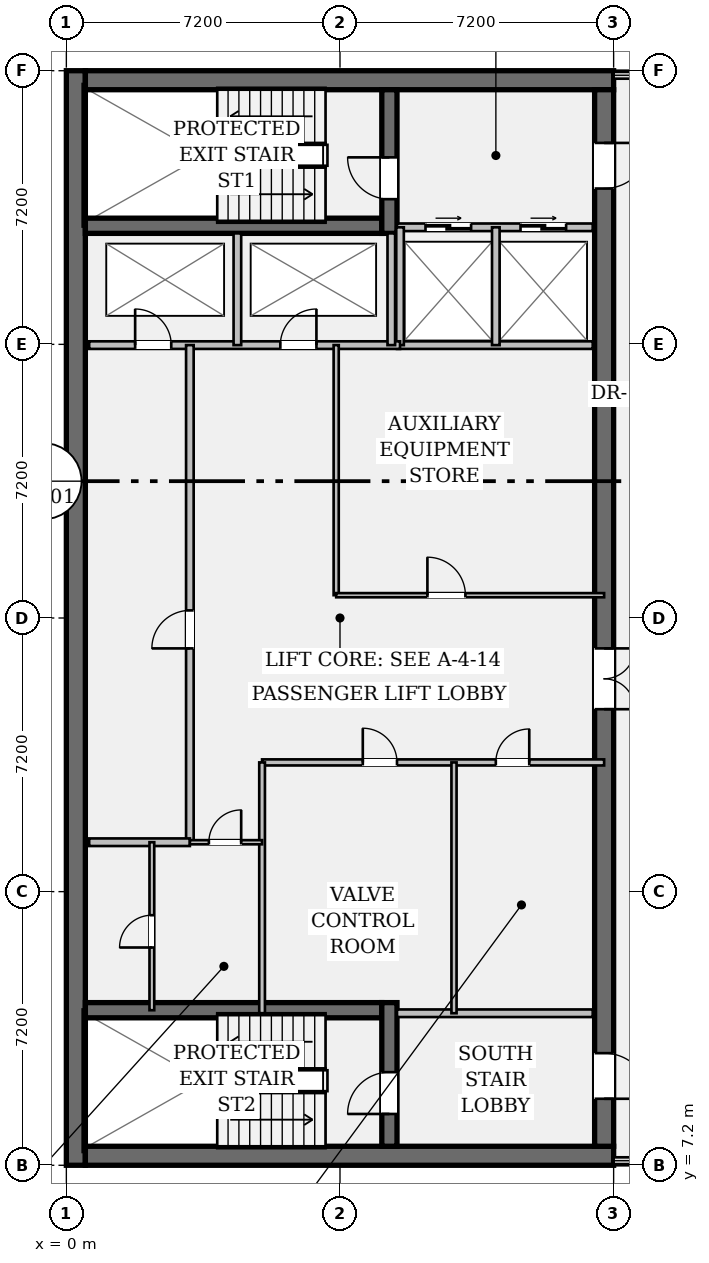
"""IFC4 building model, lengths in metres.
Left out: names, types, materials, properties, quantities, classifications, styles, units other than length and angle.
Written with IfcOpenShell. Run it as: python <this file> out.ifc"""

import sys

from ifc_helpers import new_model, si_unit, direction, frame, frame_2d, origin, place, context, subcontext, project, spatial, rectangle, extrude, element, fill, save


model = new_model("IFC4")
c1 = context("Model", 3, precision=1e-05, world=origin(), true_north=direction((0.0, 1.0)))
c2 = subcontext(c1, "Body", "Model", "MODEL_VIEW")
j1 = project(units=[si_unit("LENGTHUNIT", "METRE"), si_unit("PLANEANGLEUNIT", "RADIAN")], contexts=[c1])
p1 = place(None, origin())
s1 = spatial("IfcSite", under=j1, at=p1, CompositionType="ELEMENT")
p2 = place(p1, origin())
s2 = spatial("IfcBuilding", under=s1, at=p2, CompositionType="ELEMENT")
p3 = place(p2, frame((0.0, 0.0, 297.5)))
s3 = spatial("IfcBuildingStorey", under=s2, at=p3, CompositionType="ELEMENT", Elevation=297.5)
p4 = place(p3, frame((0.25, 7.2, 0.0), z_axis=(0.0, 0.0, 1.0), x_axis=(0.0, 1.0, 0.0)))
e1 = element("IfcWall", 1, at=p4, inside=s3, PredefinedType="SHEAR", context=c2, shape_type="SweptSolid", body=[
    extrude(rectangle(XDim=28.8, YDim=0.5, at=frame_2d((14.4, 0.0))), origin(), (0.0, 0.0, 1.0), 3.59),
])
for number, where, z_axis, x_axis in (
    (2, (0.5, 7.45, 0.0), (0.0, 0.0, 1.0), (1.0, 0.0, 0.0)),
    (3, (0.5, 35.75, 0.0), (0.0, 0.0, 1.0), (1.0, 0.0, 0.0)),
):
    element("IfcWall", number, at=place(p3, frame(where, z_axis=z_axis, x_axis=x_axis)), inside=s3, PredefinedType="SHEAR", context=c2, shape_type="SweptSolid", body=[
        extrude(rectangle(XDim=13.9, YDim=0.5, at=frame_2d((6.95, 0.0))), origin(), (0.0, 0.0, 1.0), 3.59),
    ])
p5 = place(p3, frame((14.15, 35.5, 0.0), z_axis=(0.0, 0.0, 1.0), x_axis=(0.0, -1.0, 0.0)))
e4 = element("IfcWall", 4, at=p5, inside=s3, PredefinedType="SHEAR", context=c2, shape_type="SweptSolid", body=[
    extrude(rectangle(XDim=27.8, YDim=0.5, at=frame_2d((13.9, 0.0))), origin(), (0.0, 0.0, 1.0), 3.59),
])
p6 = place(p5, frame((1.4, 0.0, 0.0)))
e5 = element("IfcOpeningElement", 5, at=p6, cuts=e4, PredefinedType="OPENING", context=c2, shape_type="SweptSolid", body=[
    extrude(rectangle(XDim=1.2, YDim=2.15, at=frame_2d((0.6, 1.075))), frame((0.0, 0.262, 0.0), z_axis=(0.0, -1.0, 0.0), x_axis=(1.0, 0.0, 0.0)), (0.0, 0.0, 1.0), 0.524),
])
p7 = place(p5, frame((25.35, 0.0, 0.0)))
e6 = element("IfcOpeningElement", 6, at=p7, cuts=e4, PredefinedType="OPENING", context=c2, shape_type="SweptSolid", body=[
    extrude(rectangle(XDim=1.2, YDim=2.15, at=frame_2d((0.6, 1.075))), frame((0.0, 0.262, 0.0), z_axis=(0.0, -1.0, 0.0), x_axis=(1.0, 0.0, 0.0)), (0.0, 0.0, 1.0), 0.524),
])
p8 = place(p5, frame((14.7, 0.0, 0.0)))
e7 = element("IfcOpeningElement", 7, at=p8, cuts=e4, PredefinedType="OPENING", context=c2, shape_type="SweptSolid", body=[
    extrude(rectangle(XDim=1.6, YDim=2.2, at=frame_2d((0.8, 1.1))), frame((0.0, 0.262, 0.0), z_axis=(0.0, -1.0, 0.0), x_axis=(1.0, 0.0, 0.0)), (0.0, 0.0, 1.0), 0.524),
])
for number, where, z_axis, x_axis in (
    (8, (0.5, 31.92, 0.0), (0.0, 0.0, 1.0), (1.0, 0.0, 0.0)),
    (9, (0.5, 11.28, 0.0), (0.0, 0.0, 1.0), (1.0, 0.0, 0.0)),
):
    element("IfcWall", number, at=place(p3, frame(where, z_axis=z_axis, x_axis=x_axis)), inside=s3, PredefinedType="SHEAR", context=c2, shape_type="SweptSolid", body=[
        extrude(rectangle(XDim=7.8, YDim=0.4, at=frame_2d((3.9, 0.0))), origin(), (0.0, 0.0, 1.0), 3.59),
    ])
p9 = place(p3, frame((8.5, 31.72, 0.0), z_axis=(0.0, 0.0, 1.0), x_axis=(0.0, 1.0, 0.0)))
e10 = element("IfcWall", 10, at=p9, inside=s3, PredefinedType="SHEAR", context=c2, shape_type="SweptSolid", body=[
    extrude(rectangle(XDim=3.78, YDim=0.4, at=frame_2d((1.89, 0.0))), origin(), (0.0, 0.0, 1.0), 3.59),
])
p10 = place(p9, frame((0.9, 0.0, 0.0)))
e11 = element("IfcOpeningElement", 11, at=p10, cuts=e10, PredefinedType="OPENING", context=c2, shape_type="SweptSolid", body=[
    extrude(rectangle(XDim=1.1, YDim=2.15, at=frame_2d((0.55, 1.075))), frame((0.0, 0.212, 0.0), z_axis=(0.0, -1.0, 0.0), x_axis=(1.0, 0.0, 0.0)), (0.0, 0.0, 1.0), 0.424),
])
p11 = place(p3, frame((8.5, 7.7, 0.0), z_axis=(0.0, 0.0, 1.0), x_axis=(0.0, 1.0, 0.0)))
e12 = element("IfcWall", 12, at=p11, inside=s3, PredefinedType="SHEAR", context=c2, shape_type="SweptSolid", body=[
    extrude(rectangle(XDim=3.78, YDim=0.4, at=frame_2d((1.89, 0.0))), origin(), (0.0, 0.0, 1.0), 3.59),
])
p12 = place(p11, frame((0.85, 0.0, 0.0)))
e13 = element("IfcOpeningElement", 13, at=p12, cuts=e12, PredefinedType="OPENING", context=c2, shape_type="SweptSolid", body=[
    extrude(rectangle(XDim=1.1, YDim=2.15, at=frame_2d((0.55, 1.075))), frame((0.0, 0.212, 0.0), z_axis=(0.0, -1.0, 0.0), x_axis=(1.0, 0.0, 0.0)), (0.0, 0.0, 1.0), 0.424),
])
p13 = place(p3, frame((8.7, 31.88, 0.0), z_axis=(0.0, 0.0, 1.0), x_axis=(1.0, 0.0, 0.0)))
e14 = element("IfcWall", 14, at=p13, inside=s3, PredefinedType="PARTITIONING", context=c2, shape_type="SweptSolid", body=[
    extrude(rectangle(XDim=5.15, YDim=0.2, at=frame_2d((2.575, 0.0))), origin(), (0.0, 0.0, 1.0), 3.59),
])
p14 = place(p13, frame((0.75, 0.0, 0.0)))
e15 = element("IfcOpeningElement", 15, at=p14, cuts=e14, PredefinedType="OPENING", context=c2, shape_type="SweptSolid", body=[
    extrude(rectangle(XDim=1.2, YDim=2.2, at=frame_2d((0.6, 1.1))), frame((0.0, 0.112, 0.0), z_axis=(0.0, -1.0, 0.0), x_axis=(1.0, 0.0, 0.0)), (0.0, 0.0, 1.0), 0.224),
])
p15 = place(p13, frame((3.25, 0.0, 0.0)))
e16 = element("IfcOpeningElement", 16, at=p15, cuts=e14, PredefinedType="OPENING", context=c2, shape_type="SweptSolid", body=[
    extrude(rectangle(XDim=1.2, YDim=2.2, at=frame_2d((0.6, 1.1))), frame((0.0, 0.112, 0.0), z_axis=(0.0, -1.0, 0.0), x_axis=(1.0, 0.0, 0.0)), (0.0, 0.0, 1.0), 0.224),
])
for number, where, z_axis, x_axis in (
    (17, (8.7, 11.2, 0.0), (0.0, 0.0, 1.0), (1.0, 0.0, 0.0)),
    (18, (8.7, 28.78, 0.0), (0.0, 0.0, 1.0), (1.0, 0.0, 0.0)),
):
    element("IfcWall", number, at=place(p3, frame(where, z_axis=z_axis, x_axis=x_axis)), inside=s3, PredefinedType="PARTITIONING", context=c2, shape_type="SweptSolid", body=[
        extrude(rectangle(XDim=5.15, YDim=0.2, at=frame_2d((2.575, 0.0))), origin(), (0.0, 0.0, 1.0), 3.59),
    ])
for number, where, z_axis, x_axis in (
    (19, (8.78, 28.78, 0.0), (0.0, 0.0, 1.0), (0.0, 1.0, 0.0)),
    (20, (11.3, 28.78, 0.0), (0.0, 0.0, 1.0), (0.0, 1.0, 0.0)),
):
    element("IfcWall", number, at=place(p3, frame(where, z_axis=z_axis, x_axis=x_axis)), inside=s3, PredefinedType="PARTITIONING", context=c2, shape_type="SweptSolid", body=[
        extrude(rectangle(XDim=3.1, YDim=0.2, at=frame_2d((1.55, 0.0))), origin(), (0.0, 0.0, 1.0), 3.59),
    ])
p16 = place(p3, frame((0.6, 28.78, 0.0), z_axis=(0.0, 0.0, 1.0), x_axis=(1.0, 0.0, 0.0)))
e21 = element("IfcWall", 21, at=p16, inside=s3, PredefinedType="PARTITIONING", context=c2, shape_type="SweptSolid", body=[
    extrude(rectangle(XDim=8.18, YDim=0.2, at=frame_2d((4.09, 0.0))), origin(), (0.0, 0.0, 1.0), 3.59),
])
p17 = place(p16, frame((1.21, 0.0, 0.0)))
e22 = element("IfcOpeningElement", 22, at=p17, cuts=e21, PredefinedType="OPENING", context=c2, shape_type="SweptSolid", body=[
    extrude(rectangle(XDim=0.95, YDim=2.15, at=frame_2d((0.475, 1.075))), frame((0.0, 0.112, 0.0), z_axis=(0.0, -1.0, 0.0), x_axis=(1.0, 0.0, 0.0)), (0.0, 0.0, 1.0), 0.224),
])
p18 = place(p16, frame((5.03, 0.0, 0.0)))
e23 = element("IfcOpeningElement", 23, at=p18, cuts=e21, PredefinedType="OPENING", context=c2, shape_type="SweptSolid", body=[
    extrude(rectangle(XDim=0.95, YDim=2.15, at=frame_2d((0.475, 1.075))), frame((0.0, 0.112, 0.0), z_axis=(0.0, -1.0, 0.0), x_axis=(1.0, 0.0, 0.0)), (0.0, 0.0, 1.0), 0.224),
])
for number, where, z_axis, x_axis in (
    (24, (4.5, 28.78, 0.0), (0.0, 0.0, 1.0), (0.0, 1.0, 0.0)),
    (25, (8.55, 28.78, 0.0), (0.0, 0.0, 1.0), (0.0, 1.0, 0.0)),
):
    element("IfcWall", number, at=place(p3, frame(where, z_axis=z_axis, x_axis=x_axis)), inside=s3, PredefinedType="PARTITIONING", context=c2, shape_type="SweptSolid", body=[
        extrude(rectangle(XDim=2.94, YDim=0.2, at=frame_2d((1.47, 0.0))), origin(), (0.0, 0.0, 1.0), 3.59),
    ])
p19 = place(p3, frame((3.25, 15.7, 0.0), z_axis=(0.0, 0.0, 1.0), x_axis=(0.0, 1.0, 0.0)))
e26 = element("IfcWall", 26, at=p19, inside=s3, PredefinedType="PARTITIONING", context=c2, shape_type="SweptSolid", body=[
    extrude(rectangle(XDim=13.08, YDim=0.2, at=frame_2d((6.54, 0.0))), origin(), (0.0, 0.0, 1.0), 3.59),
])
p20 = place(p19, frame((5.1, 0.0, 0.0)))
e27 = element("IfcOpeningElement", 27, at=p20, cuts=e26, PredefinedType="OPENING", context=c2, shape_type="SweptSolid", body=[
    extrude(rectangle(XDim=1.0, YDim=2.15, at=frame_2d((0.5, 1.075))), frame((0.0, 0.112, 0.0), z_axis=(0.0, -1.0, 0.0), x_axis=(1.0, 0.0, 0.0)), (0.0, 0.0, 1.0), 0.224),
])
p21 = place(p3, frame((0.6, 15.7, 0.0), z_axis=(0.0, 0.0, 1.0), x_axis=(1.0, 0.0, 0.0)))
e28 = element("IfcWall", 28, at=p21, inside=s3, PredefinedType="PARTITIONING", context=c2, shape_type="SweptSolid", body=[
    extrude(rectangle(XDim=2.65, YDim=0.2, at=frame_2d((1.325, 0.0))), origin(), (0.0, 0.0, 1.0), 3.59),
])
p22 = place(p3, frame((7.1, 22.2, 0.0), z_axis=(0.0, 0.0, 1.0), x_axis=(0.0, 1.0, 0.0)))
e29 = element("IfcWall", 29, at=p22, inside=s3, PredefinedType="PARTITIONING", context=c2, shape_type="SweptSolid", body=[
    extrude(rectangle(XDim=6.58, YDim=0.135, at=frame_2d((3.29, 0.0))), origin(), (0.0, 0.0, 1.0), 3.59),
])
p23 = place(p3, frame((7.1, 22.2, 0.0), z_axis=(0.0, 0.0, 1.0), x_axis=(1.0, 0.0, 0.0)))
e30 = element("IfcWall", 30, at=p23, inside=s3, PredefinedType="PARTITIONING", context=c2, shape_type="SweptSolid", body=[
    extrude(rectangle(XDim=7.05, YDim=0.11, at=frame_2d((3.525, 0.0))), origin(), (0.0, 0.0, 1.0), 3.59),
])
p24 = place(p23, frame((2.4, 0.0, 0.0)))
e31 = element("IfcOpeningElement", 31, at=p24, cuts=e30, PredefinedType="OPENING", context=c2, shape_type="SweptSolid", body=[
    extrude(rectangle(XDim=1.0, YDim=2.15, at=frame_2d((0.5, 1.075))), frame((0.0, 0.067, 0.0), z_axis=(0.0, -1.0, 0.0), x_axis=(1.0, 0.0, 0.0)), (0.0, 0.0, 1.0), 0.134),
])
p25 = place(p3, frame((5.15, 17.8, 0.0), z_axis=(0.0, 0.0, 1.0), x_axis=(1.0, 0.0, 0.0)))
e32 = element("IfcWall", 32, at=p25, inside=s3, PredefinedType="PARTITIONING", context=c2, shape_type="SweptSolid", body=[
    extrude(rectangle(XDim=9.0, YDim=0.16, at=frame_2d((4.5, 0.0))), origin(), (0.0, 0.0, 1.0), 3.59),
])
p26 = place(p25, frame((2.65, 0.0, 0.0)))
e33 = element("IfcOpeningElement", 33, at=p26, cuts=e32, PredefinedType="OPENING", context=c2, shape_type="SweptSolid", body=[
    extrude(rectangle(XDim=0.9, YDim=2.15, at=frame_2d((0.45, 1.075))), frame((0.0, 0.092, 0.0), z_axis=(0.0, -1.0, 0.0), x_axis=(1.0, 0.0, 0.0)), (0.0, 0.0, 1.0), 0.184),
])
p27 = place(p25, frame((6.15, 0.0, 0.0)))
e34 = element("IfcOpeningElement", 34, at=p27, cuts=e32, PredefinedType="OPENING", context=c2, shape_type="SweptSolid", body=[
    extrude(rectangle(XDim=0.88, YDim=2.15, at=frame_2d((0.44, 1.075))), frame((0.0, 0.092, 0.0), z_axis=(0.0, -1.0, 0.0), x_axis=(1.0, 0.0, 0.0)), (0.0, 0.0, 1.0), 0.184),
])
p28 = place(p3, frame((5.15, 11.2, 0.0), z_axis=(0.0, 0.0, 1.0), x_axis=(0.0, 1.0, 0.0)))
e35 = element("IfcWall", 35, at=p28, inside=s3, PredefinedType="PARTITIONING", context=c2, shape_type="SweptSolid", body=[
    extrude(rectangle(XDim=6.6, YDim=0.15, at=frame_2d((3.3, 0.0))), origin(), (0.0, 0.0, 1.0), 3.59),
])
p29 = place(p3, frame((10.2, 11.2, 0.0), z_axis=(0.0, 0.0, 1.0), x_axis=(0.0, 1.0, 0.0)))
e36 = element("IfcWall", 36, at=p29, inside=s3, PredefinedType="PARTITIONING", context=c2, shape_type="SweptSolid", body=[
    extrude(rectangle(XDim=6.6, YDim=0.135, at=frame_2d((3.3, 0.0))), origin(), (0.0, 0.0, 1.0), 3.59),
])
p30 = place(p3, frame((3.25, 15.7, 0.0), z_axis=(0.0, 0.0, 1.0), x_axis=(1.0, 0.0, 0.0)))
e37 = element("IfcWall", 37, at=p30, inside=s3, PredefinedType="PARTITIONING", context=c2, shape_type="SweptSolid", body=[
    extrude(rectangle(XDim=1.9, YDim=0.11, at=frame_2d((0.95, 0.0))), origin(), (0.0, 0.0, 1.0), 3.59),
])
p31 = place(p30, frame((0.5, 0.0, 0.0)))
e38 = element("IfcOpeningElement", 38, at=p31, cuts=e37, PredefinedType="OPENING", context=c2, shape_type="SweptSolid", body=[
    extrude(rectangle(XDim=0.85, YDim=2.15, at=frame_2d((0.425, 1.075))), frame((0.0, 0.067, 0.0), z_axis=(0.0, -1.0, 0.0), x_axis=(1.0, 0.0, 0.0)), (0.0, 0.0, 1.0), 0.134),
])
p32 = place(p3, frame((2.25, 11.28, 0.0), z_axis=(0.0, 0.0, 1.0), x_axis=(0.0, 1.0, 0.0)))
e39 = element("IfcWall", 39, at=p32, inside=s3, PredefinedType="PARTITIONING", context=c2, shape_type="SweptSolid", body=[
    extrude(rectangle(XDim=4.42, YDim=0.125, at=frame_2d((2.21, 0.0))), origin(), (0.0, 0.0, 1.0), 3.59),
])
p33 = place(p32, frame((1.65, 0.0, 0.0)))
e40 = element("IfcOpeningElement", 40, at=p33, cuts=e39, PredefinedType="OPENING", context=c2, shape_type="SweptSolid", body=[
    extrude(rectangle(XDim=0.85, YDim=2.15, at=frame_2d((0.425, 1.075))), frame((0.0, 0.074, 0.0), z_axis=(0.0, -1.0, 0.0), x_axis=(1.0, 0.0, 0.0)), (0.0, 0.0, 1.0), 0.149),
])
p34 = place(p10, origin())
e41 = element("IfcDoor", 41, at=p34, inside=s3, OperationType="SINGLE_SWING_RIGHT", PredefinedType="DOOR", context=c2, shape_type="SweptSolid", body=[
    extrude(rectangle(XDim=1.1, YDim=2.15, at=frame_2d((0.55, 1.075))), frame((0.0, 0.025, 0.0), z_axis=(0.0, -1.0, 0.0), x_axis=(1.0, 0.0, 0.0)), (0.0, 0.0, 1.0), 0.05),
])
fill(e11, e41)
p35 = place(p6, origin())
e42 = element("IfcDoor", 42, at=p35, inside=s3, OperationType="SINGLE_SWING_LEFT", PredefinedType="DOOR", context=c2, shape_type="SweptSolid", body=[
    extrude(rectangle(XDim=1.2, YDim=2.15, at=frame_2d((0.6, 1.075))), frame((0.0, 0.025, 0.0), z_axis=(0.0, -1.0, 0.0), x_axis=(1.0, 0.0, 0.0)), (0.0, 0.0, 1.0), 0.05),
])
fill(e5, e42)
p36 = place(p12, origin())
e43 = element("IfcDoor", 43, at=p36, inside=s3, OperationType="SINGLE_SWING_LEFT", PredefinedType="DOOR", context=c2, shape_type="SweptSolid", body=[
    extrude(rectangle(XDim=1.1, YDim=2.15, at=frame_2d((0.55, 1.075))), frame((0.0, 0.025, 0.0), z_axis=(0.0, -1.0, 0.0), x_axis=(1.0, 0.0, 0.0)), (0.0, 0.0, 1.0), 0.05),
])
fill(e13, e43)
p37 = place(p7, origin())
e44 = element("IfcDoor", 44, at=p37, inside=s3, OperationType="SINGLE_SWING_RIGHT", PredefinedType="DOOR", context=c2, shape_type="SweptSolid", body=[
    extrude(rectangle(XDim=1.2, YDim=2.15, at=frame_2d((0.6, 1.075))), frame((0.0, 0.025, 0.0), z_axis=(0.0, -1.0, 0.0), x_axis=(1.0, 0.0, 0.0)), (0.0, 0.0, 1.0), 0.05),
])
fill(e6, e44)
p38 = place(p14, origin())
e45 = element("IfcDoor", 45, at=p38, inside=s3, OperationType="DOUBLE_DOOR_SLIDING", PredefinedType="DOOR", context=c2, shape_type="SweptSolid", body=[
    extrude(rectangle(XDim=1.2, YDim=2.2, at=frame_2d((0.6, 1.1))), frame((0.0, 0.025, 0.0), z_axis=(0.0, -1.0, 0.0), x_axis=(1.0, 0.0, 0.0)), (0.0, 0.0, 1.0), 0.05),
])
fill(e15, e45)
p39 = place(p15, origin())
e46 = element("IfcDoor", 46, at=p39, inside=s3, OperationType="DOUBLE_DOOR_SLIDING", PredefinedType="DOOR", context=c2, shape_type="SweptSolid", body=[
    extrude(rectangle(XDim=1.2, YDim=2.2, at=frame_2d((0.6, 1.1))), frame((0.0, 0.025, 0.0), z_axis=(0.0, -1.0, 0.0), x_axis=(1.0, 0.0, 0.0)), (0.0, 0.0, 1.0), 0.05),
])
fill(e16, e46)
p40 = place(p17, origin())
e47 = element("IfcDoor", 47, at=p40, inside=s3, OperationType="SINGLE_SWING_LEFT", PredefinedType="DOOR", context=c2, shape_type="SweptSolid", body=[
    extrude(rectangle(XDim=0.95, YDim=2.15, at=frame_2d((0.475, 1.075))), frame((0.0, 0.025, 0.0), z_axis=(0.0, -1.0, 0.0), x_axis=(1.0, 0.0, 0.0)), (0.0, 0.0, 1.0), 0.05),
])
fill(e22, e47)
p41 = place(p18, origin())
e48 = element("IfcDoor", 48, at=p41, inside=s3, OperationType="SINGLE_SWING_RIGHT", PredefinedType="DOOR", context=c2, shape_type="SweptSolid", body=[
    extrude(rectangle(XDim=0.95, YDim=2.15, at=frame_2d((0.475, 1.075))), frame((0.0, 0.025, 0.0), z_axis=(0.0, -1.0, 0.0), x_axis=(1.0, 0.0, 0.0)), (0.0, 0.0, 1.0), 0.05),
])
fill(e23, e48)
p42 = place(p8, origin())
e49 = element("IfcDoor", 49, at=p42, inside=s3, OperationType="DOUBLE_DOOR_SINGLE_SWING", PredefinedType="DOOR", context=c2, shape_type="SweptSolid", body=[
    extrude(rectangle(XDim=1.6, YDim=2.2, at=frame_2d((0.8, 1.1))), frame((0.0, 0.025, 0.0), z_axis=(0.0, -1.0, 0.0), x_axis=(1.0, 0.0, 0.0)), (0.0, 0.0, 1.0), 0.05),
])
fill(e7, e49)
p43 = place(p20, origin())
e50 = element("IfcDoor", 50, at=p43, inside=s3, OperationType="SINGLE_SWING_LEFT", PredefinedType="DOOR", context=c2, shape_type="SweptSolid", body=[
    extrude(rectangle(XDim=1.0, YDim=2.15, at=frame_2d((0.5, 1.075))), frame((0.0, 0.025, 0.0), z_axis=(0.0, -1.0, 0.0), x_axis=(1.0, 0.0, 0.0)), (0.0, 0.0, 1.0), 0.05),
])
fill(e27, e50)
p44 = place(p24, origin())
e51 = element("IfcDoor", 51, at=p44, inside=s3, OperationType="SINGLE_SWING_LEFT", PredefinedType="DOOR", context=c2, shape_type="SweptSolid", body=[
    extrude(rectangle(XDim=1.0, YDim=2.15, at=frame_2d((0.5, 1.075))), frame((0.0, 0.025, 0.0), z_axis=(0.0, -1.0, 0.0), x_axis=(1.0, 0.0, 0.0)), (0.0, 0.0, 1.0), 0.05),
])
fill(e31, e51)
p45 = place(p26, origin())
e52 = element("IfcDoor", 52, at=p45, inside=s3, OperationType="SINGLE_SWING_LEFT", PredefinedType="DOOR", context=c2, shape_type="SweptSolid", body=[
    extrude(rectangle(XDim=0.9, YDim=2.15, at=frame_2d((0.45, 1.075))), frame((0.0, 0.025, 0.0), z_axis=(0.0, -1.0, 0.0), x_axis=(1.0, 0.0, 0.0)), (0.0, 0.0, 1.0), 0.05),
])
fill(e33, e52)
p46 = place(p27, origin())
e53 = element("IfcDoor", 53, at=p46, inside=s3, OperationType="SINGLE_SWING_RIGHT", PredefinedType="DOOR", context=c2, shape_type="SweptSolid", body=[
    extrude(rectangle(XDim=0.88, YDim=2.15, at=frame_2d((0.44, 1.075))), frame((0.0, 0.025, 0.0), z_axis=(0.0, -1.0, 0.0), x_axis=(1.0, 0.0, 0.0)), (0.0, 0.0, 1.0), 0.05),
])
fill(e34, e53)
p47 = place(p31, origin())
e54 = element("IfcDoor", 54, at=p47, inside=s3, OperationType="SINGLE_SWING_RIGHT", PredefinedType="DOOR", context=c2, shape_type="SweptSolid", body=[
    extrude(rectangle(XDim=0.85, YDim=2.15, at=frame_2d((0.425, 1.075))), frame((0.0, 0.025, 0.0), z_axis=(0.0, -1.0, 0.0), x_axis=(1.0, 0.0, 0.0)), (0.0, 0.0, 1.0), 0.05),
])
fill(e38, e54)
p48 = place(p33, origin())
e55 = element("IfcDoor", 55, at=p48, inside=s3, OperationType="SINGLE_SWING_LEFT", PredefinedType="DOOR", context=c2, shape_type="SweptSolid", body=[
    extrude(rectangle(XDim=0.85, YDim=2.15, at=frame_2d((0.425, 1.075))), frame((0.0, 0.025, 0.0), z_axis=(0.0, -1.0, 0.0), x_axis=(1.0, 0.0, 0.0)), (0.0, 0.0, 1.0), 0.05),
])
fill(e40, e55)
save(model, sys.argv[1])
